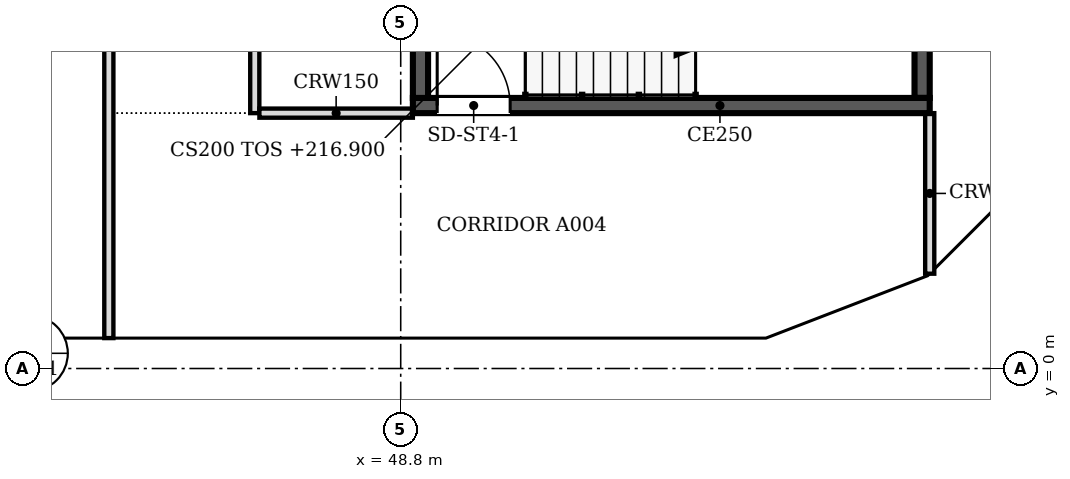
"""IFC4 building model, lengths in metres.
Left out: names, types, materials, properties, quantities, classifications, styles, units other than length and angle.
Written with IfcOpenShell. Run it as: python <this file> out.ifc"""

import sys

from ifc_helpers import new_model, si_unit, direction, frame, frame_2d, origin, place, context, subcontext, project, spatial, polyline, rectangle, outline, extrude, faceted_brep, source, transform, mapped, element, fill, save


model = new_model("IFC4")
c1 = context("Model", 3, precision=1e-05, world=origin(), true_north=direction((0.0, 1.0)))
c2 = subcontext(c1, "Body", "Model", "MODEL_VIEW")
j1 = project(units=[si_unit("LENGTHUNIT", "METRE"), si_unit("PLANEANGLEUNIT", "RADIAN")], contexts=[c1])
p1 = place(None, origin())
s1 = spatial("IfcSite", under=j1, at=p1, CompositionType="ELEMENT")
p2 = place(p1, origin())
s2 = spatial("IfcBuilding", under=s1, at=p2, CompositionType="ELEMENT")
p3 = place(p2, frame((0.0, 0.0, 216.9)))
s3 = spatial("IfcBuildingStorey", under=s2, at=p3, CompositionType="ELEMENT", Elevation=216.9)
m1 = source(origin(), c2, "Body", "SweptSolid", [
    extrude(outline(polyline([(3.05, 0.0), (6.1, 3.8), (3.05, 7.6), (0.0, 3.8), (3.05, 0.0)])), frame((0.0, 0.25, 0.0), z_axis=(0.0, -1.0, 0.0), x_axis=(1.0, 0.0, 0.0)), (0.0, 0.0, 1.0), 0.5),
])
p4 = place(p3, frame((42.7, 0.25, -3.8), z_axis=(0.0, 0.0, 1.0), x_axis=(1.0, 0.0, 0.0)))
e1 = element("IfcWall", 1, at=p4, inside=s3, PredefinedType="SOLIDWALL", context=c2, shape_type="MappedRepresentation", body=[
    mapped(m1, transform((0.0, 0.0, 0.0), scale=1.0)),
])
m2 = source(origin(), c2, "Body", "SweptSolid", [
    extrude(outline(polyline([(3.05, 0.399), (5.78, 3.8), (3.05, 7.2), (0.321, 3.8), (3.05, 0.399)])), frame((0.0, 0.26, 0.0), z_axis=(0.0, -1.0, 0.0), x_axis=(1.0, 0.0, 0.0)), (0.0, 0.0, 1.0), 0.52),
])
p5 = place(p4, origin())
e2 = element("IfcOpeningElement", 2, at=p5, cuts=e1, PredefinedType="OPENING", context=c2, shape_type="MappedRepresentation", body=[
    mapped(m2, transform((0.0, 0.0, 0.0), scale=1.0)),
])
m3 = source(origin(), c2, "Body", "Brep", [
    faceted_brep([(3.05, -0.25, 0.0), (6.053, -0.25, 3.8), (3.05, -0.25, 7.6), (0.0, -0.25, 3.8), (0.0, 0.25, 3.8), (3.05, 0.25, 7.6), (6.007, 0.25, 3.859), (6.007, 0.25, 3.741), (3.05, 0.25, 0.0), (6.053, 0.0, 3.8)], [[[0, 1, 2, 3]], [[4, 5, 6, 7, 8]], [[8, 7, 9, 1, 0]], [[6, 5, 2, 1, 9]], [[5, 4, 3, 2]], [[4, 8, 0, 3]], [[9, 7, 6]]]),
])
p6 = place(p3, frame((48.8, 0.25, -3.8), z_axis=(0.0, 0.0, 1.0), x_axis=(1.0, 0.0, 0.0)))
e3 = element("IfcWall", 3, at=p6, inside=s3, PredefinedType="SOLIDWALL", context=c2, shape_type="MappedRepresentation", body=[
    mapped(m3, transform((0.0, 0.0, 0.0), scale=1.0)),
])
m4 = source(origin(), c2, "Body", "SweptSolid", [
    extrude(outline(polyline([(3.049, 0.401), (5.735, 3.8), (3.049, 7.199), (0.321, 3.8), (3.049, 0.401)])), frame((0.0, 0.26, 0.0), z_axis=(0.0, -1.0, 0.0), x_axis=(1.0, 0.0, 0.0)), (0.0, 0.0, 1.0), 0.52),
])
p7 = place(p6, origin())
e4 = element("IfcOpeningElement", 4, at=p7, cuts=e3, PredefinedType="OPENING", context=c2, shape_type="MappedRepresentation", body=[
    mapped(m4, transform((0.0, 0.0, 0.0), scale=1.0)),
])
m5 = source(origin(), c2, "Body", "Brep", [
    faceted_brep([(2.95, -0.25, 0.0), (3.003, -0.25, 0.068), (3.003, -0.25, 7.531), (2.95, -0.25, 7.6), (0.0, -0.25, 3.8), (0.047, 0.25, 3.86), (2.898, 0.25, 7.532), (2.898, 0.25, 0.068), (0.047, 0.25, 3.74), (2.95, 0.0, 0.0), (2.95, 0.0, 7.6), (0.0, 0.0, 3.8)], [[[0, 1, 2, 3, 4]], [[5, 6, 7, 8]], [[1, 0, 9]], [[10, 3, 2]], [[6, 5, 11, 4, 3, 10]], [[8, 7, 9, 0, 4, 11]], [[8, 11, 5]], [[1, 9, 7, 6, 10, 2]]]),
])
p8 = place(p3, frame((54.854, 0.25, -3.8), z_axis=(0.0, 0.0, 1.0), x_axis=(0.932970071518, 0.359953949349, 0.0)))
e5 = element("IfcWall", 5, at=p8, inside=s3, PredefinedType="SOLIDWALL", context=c2, shape_type="MappedRepresentation", body=[
    mapped(m5, transform((0.0, 0.0, 0.0), scale=1.0)),
])
m6 = source(origin(), c2, "Body", "SweptSolid", [
    extrude(outline(polyline([(2.75, 6.935), (0.316, 3.8), (2.75, 0.665), (2.75, 6.935)])), frame((0.0, 0.26, 0.0), z_axis=(0.0, -1.0, 0.0), x_axis=(1.0, 0.0, 0.0)), (0.0, 0.0, 1.0), 0.52),
])
p9 = place(p8, origin())
e6 = element("IfcOpeningElement", 6, at=p9, cuts=e5, PredefinedType="OPENING", context=c2, shape_type="MappedRepresentation", body=[
    mapped(m6, transform((0.0, 0.0, 0.0), scale=1.0)),
])
m7 = source(origin(), c2, "Body", "Brep", [
    faceted_brep([(0.053, -0.25, 0.0), (2.997, -0.25, 3.8), (0.053, -0.25, 7.6), (0.0, -0.25, 7.532), (0.0, -0.25, 0.068), (0.106, 0.25, 7.531), (2.944, 0.25, 3.868), (2.944, 0.25, 3.732), (0.106, 0.25, 0.068), (2.997, 0.0, 3.8), (0.053, 0.0, 0.0), (0.053, 0.0, 7.6)], [[[0, 1, 2, 3, 4]], [[5, 6, 7, 8]], [[8, 7, 9, 1, 0, 10]], [[6, 5, 11, 2, 1, 9]], [[3, 2, 11]], [[10, 0, 4]], [[8, 10, 4, 3, 11, 5]], [[9, 7, 6]]]),
])
p10 = place(p3, frame((57.569, 1.274, -3.8), z_axis=(0.0, 0.0, 1.0), x_axis=(0.707066050402, 0.707147509625, 0.0)))
e7 = element("IfcWall", 7, at=p10, inside=s3, PredefinedType="SOLIDWALL", context=c2, shape_type="MappedRepresentation", body=[
    mapped(m7, transform((0.0, 0.0, 0.0), scale=1.0)),
])
m8 = source(origin(), c2, "Body", "SweptSolid", [
    extrude(outline(polyline([(0.253, 0.666), (2.681, 3.8), (0.253, 6.934), (0.253, 0.666)])), frame((0.0, 0.26, 0.0), z_axis=(0.0, -1.0, 0.0), x_axis=(1.0, 0.0, 0.0)), (0.0, 0.0, 1.0), 0.52),
])
p11 = place(p10, origin())
e8 = element("IfcOpeningElement", 8, at=p11, cuts=e7, PredefinedType="OPENING", context=c2, shape_type="MappedRepresentation", body=[
    mapped(m8, transform((0.0, 0.0, 0.0), scale=1.0)),
])
p12 = place(p2, frame((0.0, 0.0, 220.7)))
s4 = spatial("IfcBuildingStorey", under=s2, at=p12, CompositionType="ELEMENT", Elevation=220.7)
m9 = source(origin(), c2, "Body", "SweptSolid", [
    extrude(outline(polyline([(3.05, 0.0), (6.1, 3.8), (3.05, 7.6), (0.0, 3.8), (3.05, 0.0)])), frame((0.0, 0.25, 0.0), z_axis=(0.0, -1.0, 0.0), x_axis=(1.0, 0.0, 0.0)), (0.0, 0.0, 1.0), 0.5),
])
p13 = place(p12, frame((39.65, 0.25, -3.8), z_axis=(0.0, 0.0, 1.0), x_axis=(1.0, 0.0, 0.0)))
e9 = element("IfcWall", 9, at=p13, inside=s4, PredefinedType="SOLIDWALL", context=c2, shape_type="MappedRepresentation", body=[
    mapped(m9, transform((0.0, 0.0, 0.0), scale=1.0)),
])
m10 = source(origin(), c2, "Body", "SweptSolid", [
    extrude(outline(polyline([(3.05, 0.399), (5.78, 3.8), (3.05, 7.201), (0.321, 3.8), (3.05, 0.399)])), frame((0.0, 0.26, 0.0), z_axis=(0.0, -1.0, 0.0), x_axis=(1.0, 0.0, 0.0)), (0.0, 0.0, 1.0), 0.52),
])
p14 = place(p13, origin())
e10 = element("IfcOpeningElement", 10, at=p14, cuts=e9, PredefinedType="OPENING", context=c2, shape_type="MappedRepresentation", body=[
    mapped(m10, transform((0.0, 0.0, 0.0), scale=1.0)),
])
p15 = place(p12, frame((45.75, 0.25, -3.8), z_axis=(0.0, 0.0, 1.0), x_axis=(1.0, 0.0, 0.0)))
e11 = element("IfcWall", 11, at=p15, inside=s4, PredefinedType="SOLIDWALL", context=c2, shape_type="MappedRepresentation", body=[
    mapped(m9, transform((0.0, 0.0, 0.0), scale=1.0)),
])
p16 = place(p15, origin())
e12 = element("IfcOpeningElement", 12, at=p16, cuts=e11, PredefinedType="OPENING", context=c2, shape_type="MappedRepresentation", body=[
    mapped(m10, transform((0.0, 0.0, 0.0), scale=1.0)),
])
m11 = source(origin(), c2, "Body", "Brep", [
    faceted_brep([(3.003, -0.25, 0.0), (3.05, -0.25, 0.06), (3.05, -0.25, 7.54), (3.003, -0.25, 7.6), (0.0, -0.25, 3.8), (0.0, 0.25, 3.8), (2.957, 0.25, 7.541), (2.957, 0.25, 0.059), (3.003, 0.0, 0.0), (3.003, 0.0, 7.6)], [[[0, 1, 2, 3, 4]], [[5, 6, 7]], [[1, 0, 8]], [[9, 3, 2]], [[6, 5, 4, 3, 9]], [[5, 7, 8, 0, 4]], [[1, 8, 7, 6, 9, 2]]]),
])
p17 = place(p12, frame((51.85, 0.25, -3.8), z_axis=(0.0, 0.0, 1.0), x_axis=(1.0, 0.0, 0.0)))
e13 = element("IfcWall", 13, at=p17, inside=s4, PredefinedType="SOLIDWALL", context=c2, shape_type="MappedRepresentation", body=[
    mapped(m11, transform((0.0, 0.0, 0.0), scale=1.0)),
])
m12 = source(origin(), c2, "Body", "SweptSolid", [
    extrude(outline(polyline([(2.803, 6.944), (0.319, 3.8), (2.803, 0.656), (2.803, 6.944)])), frame((0.0, 0.26, 0.0), z_axis=(0.0, -1.0, 0.0), x_axis=(1.0, 0.0, 0.0)), (0.0, 0.0, 1.0), 0.52),
])
p18 = place(p17, origin())
e14 = element("IfcOpeningElement", 14, at=p18, cuts=e13, PredefinedType="OPENING", context=c2, shape_type="MappedRepresentation", body=[
    mapped(m12, transform((0.0, 0.0, 0.0), scale=1.0)),
])
m13 = source(origin(), c2, "Body", "Brep", [
    faceted_brep([(0.047, -0.25, 0.0), (2.997, -0.25, 3.8), (0.047, -0.25, 7.6), (0.0, -0.25, 7.541), (0.0, -0.25, 0.059), (0.093, 0.25, 7.54), (2.944, 0.25, 3.868), (2.944, 0.25, 3.732), (0.093, 0.25, 0.06), (2.997, 0.0, 3.8), (0.047, 0.0, 0.0), (0.047, 0.0, 7.6)], [[[0, 1, 2, 3, 4]], [[5, 6, 7, 8]], [[8, 7, 9, 1, 0, 10]], [[6, 5, 11, 2, 1, 9]], [[3, 2, 11]], [[10, 0, 4]], [[8, 10, 4, 3, 11, 5]], [[9, 7, 6]]]),
])
p19 = place(p12, frame((54.81, 0.233, -3.8), z_axis=(0.0, 0.0, 1.0), x_axis=(0.932990326376, 0.359901446078, 0.0)))
e15 = element("IfcWall", 15, at=p19, inside=s4, PredefinedType="SOLIDWALL", context=c2, shape_type="MappedRepresentation", body=[
    mapped(m13, transform((0.0, 0.0, 0.0), scale=1.0)),
])
m14 = source(origin(), c2, "Body", "SweptSolid", [
    extrude(outline(polyline([(0.247, 0.665), (2.681, 3.8), (0.247, 6.935), (0.247, 0.665)])), frame((0.0, 0.26, 0.0), z_axis=(0.0, -1.0, 0.0), x_axis=(1.0, 0.0, 0.0)), (0.0, 0.0, 1.0), 0.52),
])
p20 = place(p19, origin())
e16 = element("IfcOpeningElement", 16, at=p20, cuts=e15, PredefinedType="OPENING", context=c2, shape_type="MappedRepresentation", body=[
    mapped(m14, transform((0.0, 0.0, 0.0), scale=1.0)),
])
m15 = source(origin(), c2, "Body", "Brep", [
    faceted_brep([(2.944, -0.25, 0.0), (2.997, -0.25, 0.068), (2.997, -0.25, 7.532), (2.944, -0.25, 7.6), (0.0, -0.25, 3.8), (0.053, 0.25, 3.868), (2.891, 0.25, 7.532), (2.891, 0.25, 0.068), (0.053, 0.25, 3.732), (2.944, 0.0, 0.0), (2.944, 0.0, 7.6), (0.0, 0.0, 3.8)], [[[0, 1, 2, 3, 4]], [[5, 6, 7, 8]], [[1, 0, 9]], [[10, 3, 2]], [[6, 5, 11, 4, 3, 10]], [[8, 7, 9, 0, 4, 11]], [[8, 11, 5]], [[1, 9, 7, 6, 10, 2]]]),
])
p21 = place(p12, frame((57.606, 1.312, -3.8), z_axis=(0.0, 0.0, 1.0), x_axis=(0.707147509625, 0.707066050402, 0.0)))
e17 = element("IfcWall", 17, at=p21, inside=s4, PredefinedType="SOLIDWALL", context=c2, shape_type="MappedRepresentation", body=[
    mapped(m15, transform((0.0, 0.0, 0.0), scale=1.0)),
])
m16 = source(origin(), c2, "Body", "SweptSolid", [
    extrude(outline(polyline([(2.744, 6.934), (0.316, 3.8), (2.744, 0.667), (2.744, 6.934)])), frame((0.0, 0.26, 0.0), z_axis=(0.0, -1.0, 0.0), x_axis=(1.0, 0.0, 0.0)), (0.0, 0.0, 1.0), 0.52),
])
p22 = place(p21, origin())
e18 = element("IfcOpeningElement", 18, at=p22, cuts=e17, PredefinedType="OPENING", context=c2, shape_type="MappedRepresentation", body=[
    mapped(m16, transform((0.0, 0.0, 0.0), scale=1.0)),
])
p23 = place(p3, frame((57.5, 4.325, 0.0), z_axis=(0.0, 0.0, 1.0), x_axis=(-1.0, 0.0, 0.0)))
e19 = element("IfcWall", 19, at=p23, inside=s3, PredefinedType="SOLIDWALL", context=c2, shape_type="SweptSolid", body=[
    extrude(rectangle(XDim=8.5, YDim=0.25, at=frame_2d((4.25, 0.0))), origin(), (0.0, 0.0, 1.0), 3.8),
])
m17 = source(origin(), c2, "Body", "SweptSolid", [
    extrude(rectangle(XDim=1.2, YDim=2.1, at=frame_2d((0.6, 1.05))), frame((0.0, 0.135, 0.0), z_axis=(0.0, -1.0, 0.0), x_axis=(1.0, 0.0, 0.0)), (0.0, 0.0, 1.0), 0.27),
])
p24 = place(p23, frame((6.9, 0.0, 0.0)))
e20 = element("IfcOpeningElement", 20, at=p24, cuts=e19, PredefinedType="OPENING", context=c2, shape_type="MappedRepresentation", body=[
    mapped(m17, transform((0.0, 0.0, 0.0), scale=1.0)),
])
for number, where, z_axis, x_axis in (
    (21, (49.125, 4.45, 0.0), (0.0, 0.0, 1.0), (0.0, 1.0, 0.0)),
    (22, (57.375, 7.85, 0.0), (0.0, 0.0, 1.0), (0.0, -1.0, 0.0)),
):
    element("IfcWall", number, at=place(p3, frame(where, z_axis=z_axis, x_axis=x_axis)), inside=s3, PredefinedType="SOLIDWALL", context=c2, shape_type="SweptSolid", body=[
        extrude(rectangle(XDim=3.4, YDim=0.25, at=frame_2d((1.7, 0.0))), origin(), (0.0, 0.0, 1.0), 3.8),
    ])
p25 = place(p3, frame((44.0, 0.5, 0.0), z_axis=(0.0, 0.0, 1.0), x_axis=(0.0, 1.0, 0.0)))
e23 = element("IfcWall", 23, at=p25, inside=s3, PredefinedType="PARTITIONING", context=c2, shape_type="SweptSolid", body=[
    extrude(rectangle(XDim=21.424, YDim=0.15, at=frame_2d((10.712, 0.0))), origin(), (0.0, 0.0, 1.0), 3.067),
])
m18 = source(origin(), c2, "Body", "SweptSolid", [
    extrude(rectangle(XDim=0.9, YDim=2.1, at=frame_2d((0.45, 1.05))), frame((0.0, 0.085, 0.0), z_axis=(0.0, -1.0, 0.0), x_axis=(1.0, 0.0, 0.0)), (0.0, 0.0, 1.0), 0.17),
])
p26 = place(p25, frame((16.601, 0.0, 0.0)))
e24 = element("IfcOpeningElement", 24, at=p26, cuts=e23, PredefinedType="OPENING", context=c2, shape_type="MappedRepresentation", body=[
    mapped(m18, transform((0.0, 0.0, 0.0), scale=1.0)),
])
p27 = place(p25, frame((7.7, 0.0, 0.0)))
e25 = element("IfcOpeningElement", 25, at=p27, cuts=e23, PredefinedType="OPENING", context=c2, shape_type="MappedRepresentation", body=[
    mapped(m18, transform((0.0, 0.0, 0.0), scale=1.0)),
])
p28 = place(p3, frame((57.5, 1.559, 0.0), z_axis=(0.0, 0.0, 1.0), x_axis=(0.0, 1.0, 0.0)))
e26 = element("IfcWall", 26, at=p28, inside=s3, PredefinedType="PARTITIONING", context=c2, shape_type="SweptSolid", body=[
    extrude(rectangle(XDim=2.641, YDim=0.15, at=frame_2d((1.32, 0.0))), origin(), (0.0, 0.0, 1.0), 3.067),
])
p29 = place(p3, frame((46.4, 21.924, 0.0), z_axis=(0.0, 0.0, 1.0), x_axis=(0.0, -1.0, 0.0)))
e27 = element("IfcWall", 27, at=p29, inside=s3, PredefinedType="PARTITIONING", context=c2, shape_type="SweptSolid", body=[
    extrude(rectangle(XDim=17.724, YDim=0.15, at=frame_2d((8.862, 0.0))), origin(), (0.0, 0.0, 1.0), 3.067),
])
p30 = place(p29, frame((1.923, 0.0, 0.0)))
e28 = element("IfcOpeningElement", 28, at=p30, cuts=e27, PredefinedType="OPENING", context=c2, shape_type="MappedRepresentation", body=[
    mapped(m18, transform((0.0, 0.0, 0.0), scale=1.0)),
])
p31 = place(p29, frame((10.824, 0.0, 0.0)))
e29 = element("IfcOpeningElement", 29, at=p31, cuts=e27, PredefinedType="OPENING", context=c2, shape_type="MappedRepresentation", body=[
    mapped(m18, transform((0.0, 0.0, 0.0), scale=1.0)),
])
p32 = place(p3, frame((46.476, 4.2, 0.0), z_axis=(0.0, 0.0, 1.0), x_axis=(1.0, 0.0, 0.0)))
e30 = element("IfcWall", 30, at=p32, inside=s3, PredefinedType="PARTITIONING", context=c2, shape_type="SweptSolid", body=[
    extrude(rectangle(XDim=2.524, YDim=0.15, at=frame_2d((1.262, 0.0))), origin(), (0.0, 0.0, 1.0), 3.067),
])
m19 = source(origin(), c2, "Body", "SweptSolid", [
    extrude(rectangle(XDim=1.2, YDim=2.1, at=frame_2d((0.6, 1.05))), frame((0.0, 0.025, 0.0), z_axis=(0.0, -1.0, 0.0), x_axis=(1.0, 0.0, 0.0)), (0.0, 0.0, 1.0), 0.05),
])
p33 = place(p24, origin())
e31 = element("IfcDoor", 31, at=p33, inside=s3, OperationType="SINGLE_SWING_RIGHT", PredefinedType="DOOR", context=c2, shape_type="MappedRepresentation", body=[
    mapped(m19, transform((0.0, 0.0, 0.0), scale=1.0)),
])
fill(e20, e31)
save(model, sys.argv[1])
